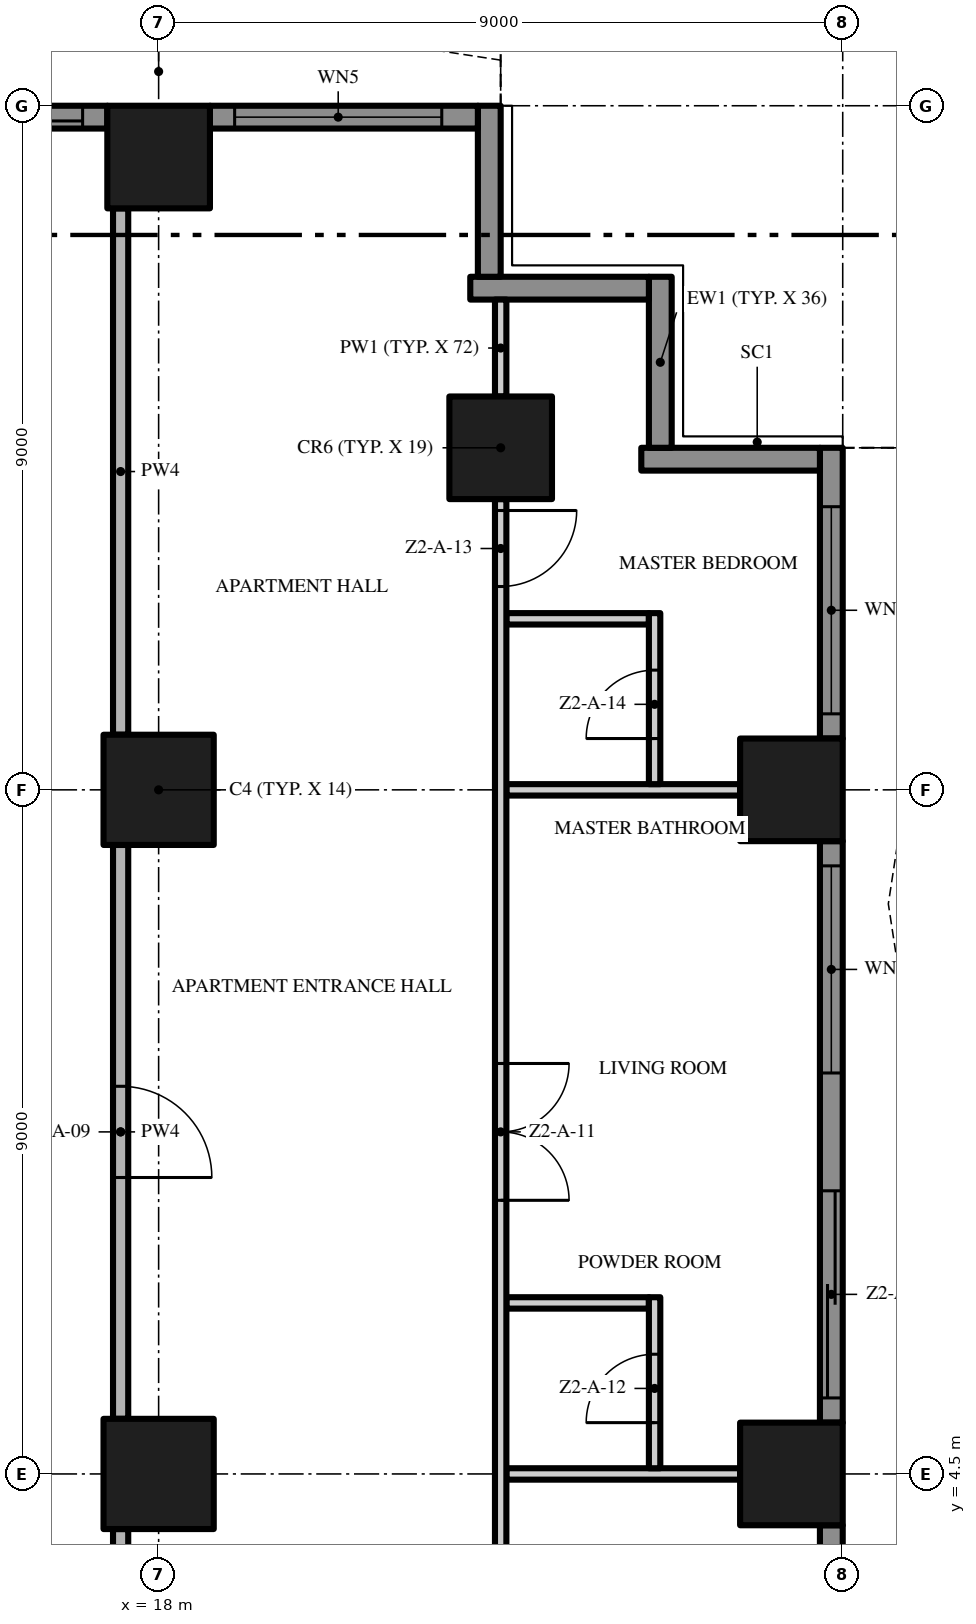
"""IFC4 building model, lengths in metres.
Left out: names, types, materials, properties, quantities, classifications, styles, units other than length and angle.
Written with IfcOpenShell. Run it as: python <this file> out.ifc"""

import sys

from ifc_helpers import new_model, si_unit, direction, frame, frame_2d, origin, origin_2d, place, context, subcontext, project, spatial, polyline, rectangle, outline, extrude, element, fill, save


model = new_model("IFC4")
c1 = context("Model", 3, precision=1e-05, world=origin(), true_north=direction((0.0, 1.0)))
c2 = subcontext(c1, "Body", "Model", "MODEL_VIEW")
j1 = project(units=[si_unit("LENGTHUNIT", "METRE"), si_unit("PLANEANGLEUNIT", "RADIAN")], contexts=[c1])
p1 = place(None, origin())
s1 = spatial("IfcSite", under=j1, at=p1, CompositionType="ELEMENT")
p2 = place(p1, origin())
s2 = spatial("IfcBuilding", under=s1, at=p2, CompositionType="ELEMENT")
p3 = place(p2, frame((0.0, 0.0, 69.4)))
s3 = spatial("IfcBuildingStorey", under=s2, at=p3, CompositionType="ELEMENT", Elevation=69.4)
p4 = place(p3, frame((18.0, 13.5, 0.0), z_axis=(0.0, 0.0, 1.0), x_axis=(1.0, 0.0, 0.0)))
e1 = element("IfcColumn", 1, at=p4, inside=s3, PredefinedType="COLUMN", context=c2, shape_type="SweptSolid", body=[
    extrude(rectangle(XDim=1.45, YDim=1.45, at=origin_2d()), origin(), (0.0, 0.0, 1.0), 3.5),
])
p5 = place(p3, frame((18.0, 21.825, 0.0), z_axis=(0.0, 0.0, 1.0), x_axis=(1.0, 0.0, 0.0)))
e2 = element("IfcColumn", 2, at=p5, inside=s3, PredefinedType="COLUMN", context=c2, shape_type="SweptSolid", body=[
    extrude(rectangle(XDim=1.35, YDim=1.35, at=origin_2d()), origin(), (0.0, 0.0, 1.0), 3.5),
])
p6 = place(p3, frame((18.0, 4.5, 0.0), z_axis=(0.0, 0.0, 1.0), x_axis=(1.0, 0.0, 0.0)))
e3 = element("IfcColumn", 3, at=p6, inside=s3, PredefinedType="COLUMN", context=c2, shape_type="SweptSolid", body=[
    extrude(rectangle(XDim=1.45, YDim=1.45, at=origin_2d()), origin(), (0.0, 0.0, 1.0), 3.5),
])
for number, where, z_axis, x_axis in (
    (4, (26.325, 13.5, 0.0), (0.0, 0.0, 1.0), (1.0, 0.0, 0.0)),
    (5, (22.5, 18.0, 0.0), (0.0, 0.0, 1.0), (1.0, 0.0, 0.0)),
    (6, (26.325, 4.5, 0.0), (0.0, 0.0, 1.0), (1.0, 0.0, 0.0)),
):
    element("IfcColumn", number, at=place(p3, frame(where, z_axis=z_axis, x_axis=x_axis)), inside=s3, PredefinedType="COLUMN", context=c2, shape_type="SweptSolid", body=[
        extrude(rectangle(XDim=1.35, YDim=1.35, at=origin_2d()), origin(), (0.0, 0.0, 1.0), 3.5),
    ])
p7 = place(p3, frame((26.85, 3.825, 0.0), z_axis=(0.0, 0.0, 1.0), x_axis=(0.0, -1.0, 0.0)))
e7 = element("IfcWall", 7, at=p7, inside=s3, PredefinedType="SOLIDWALL", context=c2, shape_type="SweptSolid", body=[
    extrude(rectangle(XDim=7.65, YDim=0.3, at=frame_2d((3.825, 0.0))), origin(), (0.0, 0.0, 1.0), 3.5),
])
p8 = place(p7, frame((4.6, 0.0, 0.45)))
e8 = element("IfcOpeningElement", 8, at=p8, cuts=e7, PredefinedType="OPENING", context=c2, shape_type="SweptSolid", body=[
    extrude(rectangle(XDim=2.725, YDim=2.65, at=frame_2d((1.363, 1.325))), frame((0.0, 0.16, 0.0), z_axis=(0.0, -1.0, 0.0), x_axis=(1.0, 0.0, 0.0)), (0.0, 0.0, 1.0), 0.32),
])
p9 = place(p7, frame((0.325, 0.0, 0.0)))
e9 = element("IfcOpeningElement", 9, at=p9, cuts=e7, PredefinedType="OPENING", context=c2, shape_type="SweptSolid", body=[
    extrude(rectangle(XDim=2.725, YDim=2.4, at=frame_2d((1.363, 1.2))), frame((0.0, 0.16, 0.0), z_axis=(0.0, -1.0, 0.0), x_axis=(1.0, 0.0, 0.0)), (0.0, 0.0, 1.0), 0.32),
])
p10 = place(p3, frame((26.85, 12.825, 0.0), z_axis=(0.0, 0.0, 1.0), x_axis=(0.0, -1.0, 0.0)))
e10 = element("IfcWall", 10, at=p10, inside=s3, PredefinedType="SOLIDWALL", context=c2, shape_type="SweptSolid", body=[
    extrude(rectangle(XDim=7.65, YDim=0.3, at=frame_2d((3.825, 0.0))), origin(), (0.0, 0.0, 1.0), 3.5),
])
p11 = place(p10, frame((4.6, 0.0, 0.0)))
e11 = element("IfcOpeningElement", 11, at=p11, cuts=e10, PredefinedType="OPENING", context=c2, shape_type="SweptSolid", body=[
    extrude(rectangle(XDim=2.725, YDim=2.4, at=frame_2d((1.363, 1.2))), frame((0.0, 0.16, 0.0), z_axis=(0.0, -1.0, 0.0), x_axis=(1.0, 0.0, 0.0)), (0.0, 0.0, 1.0), 0.32),
])
p12 = place(p10, frame((0.325, 0.0, 0.45)))
e12 = element("IfcOpeningElement", 12, at=p12, cuts=e10, PredefinedType="OPENING", context=c2, shape_type="SweptSolid", body=[
    extrude(rectangle(XDim=2.725, YDim=2.65, at=frame_2d((1.363, 1.325))), frame((0.0, 0.16, 0.0), z_axis=(0.0, -1.0, 0.0), x_axis=(1.0, 0.0, 0.0)), (0.0, 0.0, 1.0), 0.32),
])
p13 = place(p3, frame((26.85, 18.0, 0.0), z_axis=(0.0, 0.0, 1.0), x_axis=(0.0, -1.0, 0.0)))
e13 = element("IfcWall", 13, at=p13, inside=s3, PredefinedType="SOLIDWALL", context=c2, shape_type="SweptSolid", body=[
    extrude(rectangle(XDim=3.825, YDim=0.3, at=frame_2d((1.913, 0.0))), origin(), (0.0, 0.0, 1.0), 3.5),
])
p14 = place(p13, frame((0.775, 0.0, 0.45)))
e14 = element("IfcOpeningElement", 14, at=p14, cuts=e13, PredefinedType="OPENING", context=c2, shape_type="SweptSolid", body=[
    extrude(rectangle(XDim=2.725, YDim=2.65, at=frame_2d((1.363, 1.325))), frame((0.0, 0.16, 0.0), z_axis=(0.0, -1.0, 0.0), x_axis=(1.0, 0.0, 0.0)), (0.0, 0.0, 1.0), 0.32),
])
p15 = place(p3, frame((24.35, 17.85, 0.0), z_axis=(0.0, 0.0, 1.0), x_axis=(1.0, 0.0, 0.0)))
e15 = element("IfcWall", 15, at=p15, inside=s3, PredefinedType="SOLIDWALL", context=c2, shape_type="SweptSolid", body=[
    extrude(rectangle(XDim=2.35, YDim=0.3, at=frame_2d((1.175, 0.0))), origin(), (0.0, 0.0, 1.0), 3.5),
])
p16 = place(p3, frame((24.6, 20.25, 0.0), z_axis=(0.0, 0.0, 1.0), x_axis=(0.0, -1.0, 0.0)))
e16 = element("IfcWall", 16, at=p16, inside=s3, PredefinedType="SOLIDWALL", context=c2, shape_type="SweptSolid", body=[
    extrude(rectangle(XDim=2.25, YDim=0.3, at=frame_2d((1.125, 0.0))), origin(), (0.0, 0.0, 1.0), 3.5),
])
p17 = place(p3, frame((22.1, 20.1, 0.0), z_axis=(0.0, 0.0, 1.0), x_axis=(1.0, 0.0, 0.0)))
e17 = element("IfcWall", 17, at=p17, inside=s3, PredefinedType="SOLIDWALL", context=c2, shape_type="SweptSolid", body=[
    extrude(rectangle(XDim=2.35, YDim=0.3, at=frame_2d((1.175, 0.0))), origin(), (0.0, 0.0, 1.0), 3.5),
])
p18 = place(p3, frame((22.35, 22.5, 0.0), z_axis=(0.0, 0.0, 1.0), x_axis=(0.0, -1.0, 0.0)))
e18 = element("IfcWall", 18, at=p18, inside=s3, PredefinedType="SOLIDWALL", context=c2, shape_type="SweptSolid", body=[
    extrude(rectangle(XDim=2.25, YDim=0.3, at=frame_2d((1.125, 0.0))), origin(), (0.0, 0.0, 1.0), 3.5),
])
p19 = place(p3, frame((18.675, 22.35, 0.0), z_axis=(0.0, 0.0, 1.0), x_axis=(1.0, 0.0, 0.0)))
e19 = element("IfcWall", 19, at=p19, inside=s3, PredefinedType="SOLIDWALL", context=c2, shape_type="SweptSolid", body=[
    extrude(rectangle(XDim=3.525, YDim=0.3, at=frame_2d((1.762, 0.0))), origin(), (0.0, 0.0, 1.0), 3.5),
])
p20 = place(p19, frame((0.325, 0.0, 0.45)))
e20 = element("IfcOpeningElement", 20, at=p20, cuts=e19, PredefinedType="OPENING", context=c2, shape_type="SweptSolid", body=[
    extrude(rectangle(XDim=2.725, YDim=2.65, at=frame_2d((1.363, 1.325))), frame((0.0, 0.16, 0.0), z_axis=(0.0, -1.0, 0.0), x_axis=(1.0, 0.0, 0.0)), (0.0, 0.0, 1.0), 0.32),
])
p21 = place(p3, frame((13.5, 22.35, 0.0), z_axis=(0.0, 0.0, 1.0), x_axis=(1.0, 0.0, 0.0)))
e21 = element("IfcWall", 21, at=p21, inside=s3, PredefinedType="SOLIDWALL", context=c2, shape_type="SweptSolid", body=[
    extrude(rectangle(XDim=3.825, YDim=0.3, at=frame_2d((1.913, 0.0))), origin(), (0.0, 0.0, 1.0), 3.5),
])
p22 = place(p21, frame((0.775, 0.0, 0.0)))
e22 = element("IfcOpeningElement", 22, at=p22, cuts=e21, PredefinedType="OPENING", context=c2, shape_type="SweptSolid", body=[
    extrude(rectangle(XDim=2.725, YDim=2.4, at=frame_2d((1.363, 1.2))), frame((0.0, 0.16, 0.0), z_axis=(0.0, -1.0, 0.0), x_axis=(1.0, 0.0, 0.0)), (0.0, 0.0, 1.0), 0.32),
])
p23 = place(p3, origin())
e23 = element("IfcWall", 23, at=p23, inside=s3, PredefinedType="USERDEFINED", context=c2, shape_type="SweptSolid", body=[
    extrude(outline(polyline([(27.6, -18.0), (27.829, -16.5), (28.429, -15.0), (29.171, -13.5), (29.771, -12.0), (30.0, -10.5), (29.771, -9.0), (29.171, -7.5), (28.429, -6.0), (27.829, -4.5), (27.6, -3.0), (27.829, -1.5), (28.429, 0.0), (29.171, 1.5), (29.771, 3.0), (30.0, 4.5), (29.771, 6.0), (29.171, 7.5), (28.429, 9.0), (27.829, 10.5), (27.6, 12.0), (27.829, 13.5), (28.429, 15.0), (29.171, 16.5), (29.771, 18.0), (29.539, 18.093), (28.942, 16.602), (28.201, 15.102), (27.586, 13.566), (27.347, 12.0), (27.586, 10.434), (28.201, 8.898), (28.942, 7.398), (29.528, 5.934), (29.747, 4.5), (29.528, 3.066), (28.942, 1.602), (28.201, 0.102), (27.586, -1.434), (27.347, -3.0), (27.586, -4.566), (28.201, -6.102), (28.942, -7.602), (29.528, -9.066), (29.747, -10.5), (29.528, -11.934), (28.942, -13.398), (28.201, -14.898), (27.586, -16.434), (27.353, -17.962), (27.6, -18.0)])), origin(), (0.0, 0.0, 1.0), 0.9),
])
p24 = place(p3, origin())
e24 = element("IfcWall", 24, at=p24, inside=s3, PredefinedType="USERDEFINED", context=c2, shape_type="SweptSolid", body=[
    extrude(outline(polyline([(22.5, 23.1), (21.0, 23.329), (19.5, 23.929), (18.0, 24.671), (16.5, 25.271), (15.0, 25.5), (13.5, 25.271), (13.538, 25.024), (15.0, 25.247), (16.434, 25.028), (17.898, 24.442), (19.398, 23.701), (20.934, 23.086), (22.462, 22.853), (22.5, 23.1)])), origin(), (0.0, 0.0, 1.0), 0.9),
])
p25 = place(p3, frame((22.575, 4.5, 0.0), z_axis=(0.0, 0.0, 1.0), x_axis=(1.0, 0.0, 0.0)))
e25 = element("IfcWall", 25, at=p25, inside=s3, PredefinedType="PARTITIONING", context=c2, shape_type="SweptSolid", body=[
    extrude(rectangle(XDim=3.075, YDim=0.15, at=frame_2d((1.538, 0.0))), origin(), (0.0, 0.0, 1.0), 3.5),
])
p26 = place(p3, frame((22.575, 6.75, 0.0), z_axis=(0.0, 0.0, 1.0), x_axis=(1.0, 0.0, 0.0)))
e26 = element("IfcWall", 26, at=p26, inside=s3, PredefinedType="PARTITIONING", context=c2, shape_type="SweptSolid", body=[
    extrude(rectangle(XDim=1.875, YDim=0.15, at=frame_2d((0.938, 0.0))), origin(), (0.0, 0.0, 1.0), 3.5),
])
p27 = place(p3, frame((22.575, 13.5, 0.0), z_axis=(0.0, 0.0, 1.0), x_axis=(1.0, 0.0, 0.0)))
e27 = element("IfcWall", 27, at=p27, inside=s3, PredefinedType="PARTITIONING", context=c2, shape_type="SweptSolid", body=[
    extrude(rectangle(XDim=3.075, YDim=0.15, at=frame_2d((1.538, 0.0))), origin(), (0.0, 0.0, 1.0), 3.5),
])
p28 = place(p3, frame((22.575, 15.75, 0.0), z_axis=(0.0, 0.0, 1.0), x_axis=(1.0, 0.0, 0.0)))
e28 = element("IfcWall", 28, at=p28, inside=s3, PredefinedType="PARTITIONING", context=c2, shape_type="SweptSolid", body=[
    extrude(rectangle(XDim=1.875, YDim=0.15, at=frame_2d((0.938, 0.0))), origin(), (0.0, 0.0, 1.0), 3.5),
])
p29 = place(p3, frame((17.5, -0.2, 0.0), z_axis=(0.0, 0.0, 1.0), x_axis=(0.0, 1.0, 0.0)))
e29 = element("IfcWall", 29, at=p29, inside=s3, PredefinedType="PARTITIONING", context=c2, shape_type="SweptSolid", body=[
    extrude(rectangle(XDim=3.975, YDim=0.2, at=frame_2d((1.988, 0.0))), origin(), (0.0, 0.0, 1.0), 3.5),
])
p30 = place(p3, frame((17.5, 12.775, 0.0), z_axis=(0.0, 0.0, 1.0), x_axis=(0.0, -1.0, 0.0)))
e30 = element("IfcWall", 30, at=p30, inside=s3, PredefinedType="PARTITIONING", context=c2, shape_type="SweptSolid", body=[
    extrude(rectangle(XDim=7.55, YDim=0.2, at=frame_2d((3.775, 0.0))), origin(), (0.0, 0.0, 1.0), 3.5),
])
p31 = place(p30, frame((3.175, 0.0, 0.0)))
e31 = element("IfcOpeningElement", 31, at=p31, cuts=e30, PredefinedType="OPENING", context=c2, shape_type="SweptSolid", body=[
    extrude(rectangle(XDim=1.2, YDim=2.4, at=frame_2d((0.6, 1.2))), frame((0.0, 0.11, 0.0), z_axis=(0.0, -1.0, 0.0), x_axis=(1.0, 0.0, 0.0)), (0.0, 0.0, 1.0), 0.22),
])
p32 = place(p3, frame((17.5, 14.225, 0.0), z_axis=(0.0, 0.0, 1.0), x_axis=(0.0, 1.0, 0.0)))
e32 = element("IfcWall", 32, at=p32, inside=s3, PredefinedType="PARTITIONING", context=c2, shape_type="SweptSolid", body=[
    extrude(rectangle(XDim=6.925, YDim=0.2, at=frame_2d((3.462, 0.0))), origin(), (0.0, 0.0, 1.0), 3.5),
])
p33 = place(p3, frame((22.5, 17.325, 0.0), z_axis=(0.0, 0.0, 1.0), x_axis=(0.0, -1.0, 0.0)))
e33 = element("IfcWall", 33, at=p33, inside=s3, PredefinedType="PARTITIONING", context=c2, shape_type="SweptSolid", body=[
    extrude(rectangle(XDim=17.225, YDim=0.15, at=frame_2d((8.613, 0.0))), origin(), (0.0, 0.0, 1.0), 3.5),
])
p34 = place(p33, frame((14.575, 0.0, 0.0)))
e34 = element("IfcOpeningElement", 34, at=p34, cuts=e33, PredefinedType="OPENING", context=c2, shape_type="SweptSolid", body=[
    extrude(rectangle(XDim=1.0, YDim=2.4, at=frame_2d((0.5, 1.2))), frame((0.0, 0.085, 0.0), z_axis=(0.0, -1.0, 0.0), x_axis=(1.0, 0.0, 0.0)), (0.0, 0.0, 1.0), 0.17),
])
p35 = place(p33, frame((7.425, 0.0, 0.0)))
e35 = element("IfcOpeningElement", 35, at=p35, cuts=e33, PredefinedType="OPENING", context=c2, shape_type="SweptSolid", body=[
    extrude(rectangle(XDim=1.8, YDim=2.4, at=frame_2d((0.9, 1.2))), frame((0.0, 0.085, 0.0), z_axis=(0.0, -1.0, 0.0), x_axis=(1.0, 0.0, 0.0)), (0.0, 0.0, 1.0), 0.17),
])
p36 = place(p33, frame((0.15, 0.0, 0.0)))
e36 = element("IfcOpeningElement", 36, at=p36, cuts=e33, PredefinedType="OPENING", context=c2, shape_type="SweptSolid", body=[
    extrude(rectangle(XDim=1.0, YDim=2.4, at=frame_2d((0.5, 1.2))), frame((0.0, 0.085, 0.0), z_axis=(0.0, -1.0, 0.0), x_axis=(1.0, 0.0, 0.0)), (0.0, 0.0, 1.0), 0.17),
])
p37 = place(p3, frame((22.5, 18.675, 0.0), z_axis=(0.0, 0.0, 1.0), x_axis=(0.0, 1.0, 0.0)))
e37 = element("IfcWall", 37, at=p37, inside=s3, PredefinedType="PARTITIONING", context=c2, shape_type="SweptSolid", body=[
    extrude(rectangle(XDim=1.275, YDim=0.15, at=frame_2d((0.637, 0.0))), origin(), (0.0, 0.0, 1.0), 3.5),
])
p38 = place(p3, frame((24.525, 4.575, 0.0), z_axis=(0.0, 0.0, 1.0), x_axis=(0.0, 1.0, 0.0)))
e38 = element("IfcWall", 38, at=p38, inside=s3, PredefinedType="PARTITIONING", context=c2, shape_type="SweptSolid", body=[
    extrude(rectangle(XDim=2.25, YDim=0.15, at=frame_2d((1.125, 0.0))), origin(), (0.0, 0.0, 1.0), 3.5),
])
p39 = place(p38, frame((0.6, 0.0, 0.0)))
e39 = element("IfcOpeningElement", 39, at=p39, cuts=e38, PredefinedType="OPENING", context=c2, shape_type="SweptSolid", body=[
    extrude(rectangle(XDim=0.9, YDim=2.1, at=frame_2d((0.45, 1.05))), frame((0.0, 0.085, 0.0), z_axis=(0.0, -1.0, 0.0), x_axis=(1.0, 0.0, 0.0)), (0.0, 0.0, 1.0), 0.17),
])
p40 = place(p3, frame((24.525, 13.575, 0.0), z_axis=(0.0, 0.0, 1.0), x_axis=(0.0, 1.0, 0.0)))
e40 = element("IfcWall", 40, at=p40, inside=s3, PredefinedType="PARTITIONING", context=c2, shape_type="SweptSolid", body=[
    extrude(rectangle(XDim=2.25, YDim=0.15, at=frame_2d((1.125, 0.0))), origin(), (0.0, 0.0, 1.0), 3.5),
])
p41 = place(p40, frame((0.6, 0.0, 0.0)))
e41 = element("IfcOpeningElement", 41, at=p41, cuts=e40, PredefinedType="OPENING", context=c2, shape_type="SweptSolid", body=[
    extrude(rectangle(XDim=0.9, YDim=2.1, at=frame_2d((0.45, 1.05))), frame((0.0, 0.085, 0.0), z_axis=(0.0, -1.0, 0.0), x_axis=(1.0, 0.0, 0.0)), (0.0, 0.0, 1.0), 0.17),
])
p42 = place(p11, origin())
e42 = element("IfcDoor", 42, at=p42, inside=s3, OperationType="SINGLE_SWING_LEFT", PredefinedType="DOOR", context=c2, shape_type="SweptSolid", body=[
    extrude(rectangle(XDim=2.725, YDim=2.4, at=frame_2d((1.363, 1.2))), frame((0.0, 0.025, 0.0), z_axis=(0.0, -1.0, 0.0), x_axis=(1.0, 0.0, 0.0)), (0.0, 0.0, 1.0), 0.05),
])
fill(e11, e42)
p43 = place(p12, origin())
e43 = element("IfcWindow", 43, at=p43, inside=s3, PartitioningType="SINGLE_PANEL", PredefinedType="WINDOW", context=c2, shape_type="SweptSolid", body=[
    extrude(rectangle(XDim=2.725, YDim=2.65, at=frame_2d((1.363, 1.325))), frame((0.0, 0.03, 0.0), z_axis=(0.0, -1.0, 0.0), x_axis=(1.0, 0.0, 0.0)), (0.0, 0.0, 1.0), 0.06),
])
fill(e12, e43)
p44 = place(p14, origin())
e44 = element("IfcWindow", 44, at=p44, inside=s3, PartitioningType="SINGLE_PANEL", PredefinedType="WINDOW", context=c2, shape_type="SweptSolid", body=[
    extrude(rectangle(XDim=2.725, YDim=2.65, at=frame_2d((1.363, 1.325))), frame((0.0, 0.03, 0.0), z_axis=(0.0, -1.0, 0.0), x_axis=(1.0, 0.0, 0.0)), (0.0, 0.0, 1.0), 0.06),
])
fill(e14, e44)
p45 = place(p20, origin())
e45 = element("IfcWindow", 45, at=p45, inside=s3, PartitioningType="SINGLE_PANEL", PredefinedType="WINDOW", context=c2, shape_type="SweptSolid", body=[
    extrude(rectangle(XDim=2.725, YDim=2.65, at=frame_2d((1.363, 1.325))), frame((0.0, 0.03, 0.0), z_axis=(0.0, -1.0, 0.0), x_axis=(1.0, 0.0, 0.0)), (0.0, 0.0, 1.0), 0.06),
])
fill(e20, e45)
p46 = place(p22, origin())
e46 = element("IfcDoor", 46, at=p46, inside=s3, OperationType="SINGLE_SWING_LEFT", PredefinedType="DOOR", context=c2, shape_type="SweptSolid", body=[
    extrude(rectangle(XDim=2.725, YDim=2.4, at=frame_2d((1.363, 1.2))), frame((0.0, 0.025, 0.0), z_axis=(0.0, -1.0, 0.0), x_axis=(1.0, 0.0, 0.0)), (0.0, 0.0, 1.0), 0.05),
])
fill(e22, e46)
p47 = place(p31, origin())
e47 = element("IfcDoor", 47, at=p47, inside=s3, OperationType="SINGLE_SWING_RIGHT", PredefinedType="DOOR", context=c2, shape_type="SweptSolid", body=[
    extrude(rectangle(XDim=1.2, YDim=2.4, at=frame_2d((0.6, 1.2))), frame((0.0, 0.025, 0.0), z_axis=(0.0, -1.0, 0.0), x_axis=(1.0, 0.0, 0.0)), (0.0, 0.0, 1.0), 0.05),
])
fill(e31, e47)
p48 = place(p35, origin())
e48 = element("IfcDoor", 48, at=p48, inside=s3, OperationType="DOUBLE_DOOR_SINGLE_SWING", PredefinedType="DOOR", context=c2, shape_type="SweptSolid", body=[
    extrude(rectangle(XDim=1.8, YDim=2.4, at=frame_2d((0.9, 1.2))), frame((0.0, 0.025, 0.0), z_axis=(0.0, -1.0, 0.0), x_axis=(1.0, 0.0, 0.0)), (0.0, 0.0, 1.0), 0.05),
])
fill(e35, e48)
p49 = place(p39, origin())
e49 = element("IfcDoor", 49, at=p49, inside=s3, OperationType="SINGLE_SWING_LEFT", PredefinedType="DOOR", context=c2, shape_type="SweptSolid", body=[
    extrude(rectangle(XDim=0.9, YDim=2.1, at=frame_2d((0.45, 1.05))), frame((0.0, 0.025, 0.0), z_axis=(0.0, -1.0, 0.0), x_axis=(1.0, 0.0, 0.0)), (0.0, 0.0, 1.0), 0.05),
])
fill(e39, e49)
p50 = place(p36, origin())
e50 = element("IfcDoor", 50, at=p50, inside=s3, OperationType="SINGLE_SWING_LEFT", PredefinedType="DOOR", context=c2, shape_type="SweptSolid", body=[
    extrude(rectangle(XDim=1.0, YDim=2.4, at=frame_2d((0.5, 1.2))), frame((0.0, 0.025, 0.0), z_axis=(0.0, -1.0, 0.0), x_axis=(1.0, 0.0, 0.0)), (0.0, 0.0, 1.0), 0.05),
])
fill(e36, e50)
p51 = place(p41, origin())
e51 = element("IfcDoor", 51, at=p51, inside=s3, OperationType="SINGLE_SWING_LEFT", PredefinedType="DOOR", context=c2, shape_type="SweptSolid", body=[
    extrude(rectangle(XDim=0.9, YDim=2.1, at=frame_2d((0.45, 1.05))), frame((0.0, 0.025, 0.0), z_axis=(0.0, -1.0, 0.0), x_axis=(1.0, 0.0, 0.0)), (0.0, 0.0, 1.0), 0.05),
])
fill(e41, e51)
save(model, sys.argv[1])
